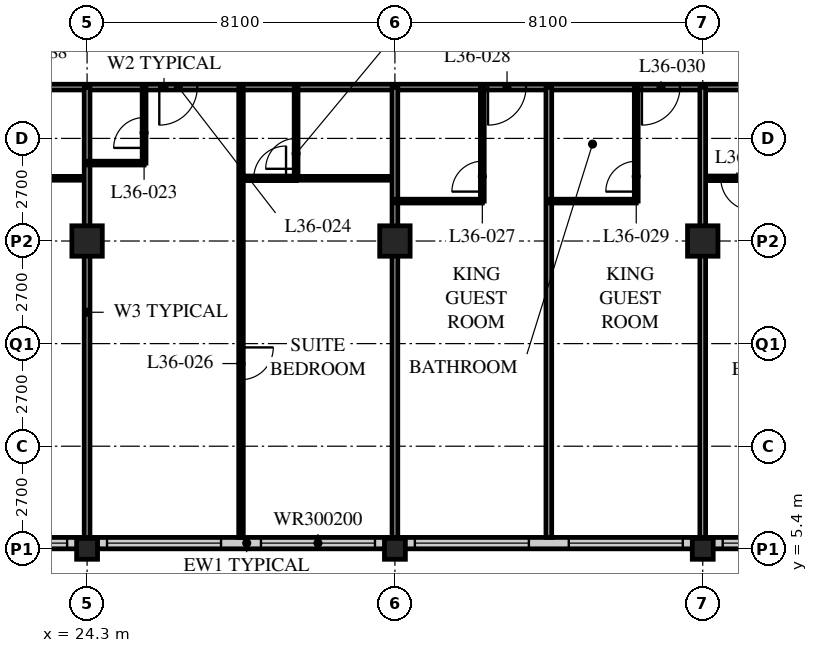
"""IFC4 building model, lengths in metres.
Left out: names, types, materials, properties, quantities, classifications, styles, units other than length and angle.
Written with IfcOpenShell. Run it as: python <this file> out.ifc"""

import sys

from ifc_helpers import new_model, si_unit, direction, frame, frame_2d, origin, origin_2d, place, context, subcontext, project, spatial, rectangle, hollow_rectangle, extrude, element, fill, save


model = new_model("IFC4")
c1 = context("Model", 3, precision=1e-05, world=origin(), true_north=direction((0.0, 1.0)))
c2 = subcontext(c1, "Body", "Model", "MODEL_VIEW")
j1 = project(units=[si_unit("LENGTHUNIT", "METRE"), si_unit("PLANEANGLEUNIT", "RADIAN")], contexts=[c1])
p1 = place(None, origin())
s1 = spatial("IfcSite", under=j1, at=p1, CompositionType="ELEMENT")
p2 = place(p1, origin())
s2 = spatial("IfcBuilding", under=s1, at=p2, CompositionType="ELEMENT")
p3 = place(p2, frame((0.0, 0.0, 140.8)))
s3 = spatial("IfcBuildingStorey", under=s2, at=p3, CompositionType="ELEMENT", Elevation=140.8)
p4 = place(p3, frame((24.3, 5.4, 0.0), z_axis=(0.0, 0.0, 1.0), x_axis=(1.0, 0.0, 0.0)))
e1 = element("IfcColumn", 1, at=p4, inside=s3, PredefinedType="COLUMN", context=c2, shape_type="SweptSolid", body=[
    extrude(hollow_rectangle(XDim=0.55, YDim=0.55, WallThickness=0.04, at=origin_2d()), origin(), (0.0, 0.0, 1.0), 3.4),
])
p5 = place(p3, frame((24.3, 13.5, 0.0), z_axis=(0.0, 0.0, 1.0), x_axis=(1.0, 0.0, 0.0)))
e2 = element("IfcColumn", 2, at=p5, inside=s3, PredefinedType="COLUMN", context=c2, shape_type="SweptSolid", body=[
    extrude(hollow_rectangle(XDim=0.8, YDim=0.8, WallThickness=0.08, at=origin_2d()), origin(), (0.0, 0.0, 1.0), 3.4),
])
p6 = place(p3, frame((32.4, 5.4, 0.0), z_axis=(0.0, 0.0, 1.0), x_axis=(1.0, 0.0, 0.0)))
e3 = element("IfcColumn", 3, at=p6, inside=s3, PredefinedType="COLUMN", context=c2, shape_type="SweptSolid", body=[
    extrude(hollow_rectangle(XDim=0.55, YDim=0.55, WallThickness=0.04, at=origin_2d()), origin(), (0.0, 0.0, 1.0), 3.4),
])
p7 = place(p3, frame((32.4, 13.5, 0.0), z_axis=(0.0, 0.0, 1.0), x_axis=(1.0, 0.0, 0.0)))
e4 = element("IfcColumn", 4, at=p7, inside=s3, PredefinedType="COLUMN", context=c2, shape_type="SweptSolid", body=[
    extrude(hollow_rectangle(XDim=0.8, YDim=0.8, WallThickness=0.08, at=origin_2d()), origin(), (0.0, 0.0, 1.0), 3.4),
])
p8 = place(p3, frame((40.5, 5.4, 0.0), z_axis=(0.0, 0.0, 1.0), x_axis=(1.0, 0.0, 0.0)))
e5 = element("IfcColumn", 5, at=p8, inside=s3, PredefinedType="COLUMN", context=c2, shape_type="SweptSolid", body=[
    extrude(hollow_rectangle(XDim=0.55, YDim=0.55, WallThickness=0.04, at=origin_2d()), origin(), (0.0, 0.0, 1.0), 3.4),
])
p9 = place(p3, frame((40.5, 13.5, 0.0), z_axis=(0.0, 0.0, 1.0), x_axis=(1.0, 0.0, 0.0)))
e6 = element("IfcColumn", 6, at=p9, inside=s3, PredefinedType="COLUMN", context=c2, shape_type="SweptSolid", body=[
    extrude(hollow_rectangle(XDim=0.8, YDim=0.8, WallThickness=0.08, at=origin_2d()), origin(), (0.0, 0.0, 1.0), 3.4),
])
p10 = place(p3, frame((8.4, 5.55, 0.0), z_axis=(0.0, 0.0, 1.0), x_axis=(1.0, 0.0, 0.0)))
e7 = element("IfcWall", 7, at=p10, inside=s3, PredefinedType="SOLIDWALL", context=c2, shape_type="SweptSolid", body=[
    extrude(rectangle(XDim=40.2, YDim=0.3, at=frame_2d((20.1, 0.0))), origin(), (0.0, 0.0, 1.0), 3.19),
])
p11 = place(p10, frame((0.225, 0.0, 0.9)))
e8 = element("IfcOpeningElement", 8, at=p11, cuts=e7, PredefinedType="OPENING", context=c2, shape_type="SweptSolid", body=[
    extrude(rectangle(XDim=3.0, YDim=2.0, at=frame_2d((1.5, 1.0))), frame((0.0, 0.16, 0.0), z_axis=(0.0, -1.0, 0.0), x_axis=(1.0, 0.0, 0.0)), (0.0, 0.0, 1.0), 0.32),
])
p12 = place(p10, frame((4.275, 0.0, 0.9)))
e9 = element("IfcOpeningElement", 9, at=p12, cuts=e7, PredefinedType="OPENING", context=c2, shape_type="SweptSolid", body=[
    extrude(rectangle(XDim=3.0, YDim=2.0, at=frame_2d((1.5, 1.0))), frame((0.0, 0.16, 0.0), z_axis=(0.0, -1.0, 0.0), x_axis=(1.0, 0.0, 0.0)), (0.0, 0.0, 1.0), 0.32),
])
p13 = place(p10, frame((8.325, 0.0, 0.9)))
e10 = element("IfcOpeningElement", 10, at=p13, cuts=e7, PredefinedType="OPENING", context=c2, shape_type="SweptSolid", body=[
    extrude(rectangle(XDim=3.0, YDim=2.0, at=frame_2d((1.5, 1.0))), frame((0.0, 0.16, 0.0), z_axis=(0.0, -1.0, 0.0), x_axis=(1.0, 0.0, 0.0)), (0.0, 0.0, 1.0), 0.32),
])
p14 = place(p10, frame((12.375, 0.0, 0.9)))
e11 = element("IfcOpeningElement", 11, at=p14, cuts=e7, PredefinedType="OPENING", context=c2, shape_type="SweptSolid", body=[
    extrude(rectangle(XDim=3.0, YDim=2.0, at=frame_2d((1.5, 1.0))), frame((0.0, 0.16, 0.0), z_axis=(0.0, -1.0, 0.0), x_axis=(1.0, 0.0, 0.0)), (0.0, 0.0, 1.0), 0.32),
])
p15 = place(p10, frame((16.425, 0.0, 0.9)))
e12 = element("IfcOpeningElement", 12, at=p15, cuts=e7, PredefinedType="OPENING", context=c2, shape_type="SweptSolid", body=[
    extrude(rectangle(XDim=3.0, YDim=2.0, at=frame_2d((1.5, 1.0))), frame((0.0, 0.16, 0.0), z_axis=(0.0, -1.0, 0.0), x_axis=(1.0, 0.0, 0.0)), (0.0, 0.0, 1.0), 0.32),
])
p16 = place(p10, frame((20.475, 0.0, 0.9)))
e13 = element("IfcOpeningElement", 13, at=p16, cuts=e7, PredefinedType="OPENING", context=c2, shape_type="SweptSolid", body=[
    extrude(rectangle(XDim=3.0, YDim=2.0, at=frame_2d((1.5, 1.0))), frame((0.0, 0.16, 0.0), z_axis=(0.0, -1.0, 0.0), x_axis=(1.0, 0.0, 0.0)), (0.0, 0.0, 1.0), 0.32),
])
p17 = place(p10, frame((24.525, 0.0, 0.9)))
e14 = element("IfcOpeningElement", 14, at=p17, cuts=e7, PredefinedType="OPENING", context=c2, shape_type="SweptSolid", body=[
    extrude(rectangle(XDim=3.0, YDim=2.0, at=frame_2d((1.5, 1.0))), frame((0.0, 0.16, 0.0), z_axis=(0.0, -1.0, 0.0), x_axis=(1.0, 0.0, 0.0)), (0.0, 0.0, 1.0), 0.32),
])
p18 = place(p10, frame((28.575, 0.0, 0.9)))
e15 = element("IfcOpeningElement", 15, at=p18, cuts=e7, PredefinedType="OPENING", context=c2, shape_type="SweptSolid", body=[
    extrude(rectangle(XDim=3.0, YDim=2.0, at=frame_2d((1.5, 1.0))), frame((0.0, 0.16, 0.0), z_axis=(0.0, -1.0, 0.0), x_axis=(1.0, 0.0, 0.0)), (0.0, 0.0, 1.0), 0.32),
])
p19 = place(p10, frame((32.625, 0.0, 0.9)))
e16 = element("IfcOpeningElement", 16, at=p19, cuts=e7, PredefinedType="OPENING", context=c2, shape_type="SweptSolid", body=[
    extrude(rectangle(XDim=3.0, YDim=2.0, at=frame_2d((1.5, 1.0))), frame((0.0, 0.16, 0.0), z_axis=(0.0, -1.0, 0.0), x_axis=(1.0, 0.0, 0.0)), (0.0, 0.0, 1.0), 0.32),
])
p20 = place(p10, frame((36.675, 0.0, 0.9)))
e17 = element("IfcOpeningElement", 17, at=p20, cuts=e7, PredefinedType="OPENING", context=c2, shape_type="SweptSolid", body=[
    extrude(rectangle(XDim=3.0, YDim=2.0, at=frame_2d((1.5, 1.0))), frame((0.0, 0.16, 0.0), z_axis=(0.0, -1.0, 0.0), x_axis=(1.0, 0.0, 0.0)), (0.0, 0.0, 1.0), 0.32),
])
p21 = place(p3, frame((8.1, 17.55, 0.0), z_axis=(0.0, 0.0, 1.0), x_axis=(1.0, 0.0, 0.0)))
e18 = element("IfcWall", 18, at=p21, inside=s3, PredefinedType="PARTITIONING", context=c2, shape_type="SweptSolid", body=[
    extrude(rectangle(XDim=36.45, YDim=0.15, at=frame_2d((18.225, 0.0))), origin(), (0.0, 0.0, 1.0), 3.19),
])
p22 = place(p21, frame((9.625, 0.0, 0.0)))
e19 = element("IfcOpeningElement", 19, at=p22, cuts=e18, PredefinedType="OPENING", context=c2, shape_type="SweptSolid", body=[
    extrude(rectangle(XDim=1.0, YDim=2.1, at=frame_2d((0.5, 1.05))), frame((0.0, 0.085, 0.0), z_axis=(0.0, -1.0, 0.0), x_axis=(1.0, 0.0, 0.0)), (0.0, 0.0, 1.0), 0.17),
])
p23 = place(p21, frame((18.1, 0.0, 0.0)))
e20 = element("IfcOpeningElement", 20, at=p23, cuts=e18, PredefinedType="OPENING", context=c2, shape_type="SweptSolid", body=[
    extrude(rectangle(XDim=1.0, YDim=2.1, at=frame_2d((0.5, 1.05))), frame((0.0, 0.085, 0.0), z_axis=(0.0, -1.0, 0.0), x_axis=(1.0, 0.0, 0.0)), (0.0, 0.0, 1.0), 0.17),
])
p24 = place(p21, frame((26.75, 0.0, 0.0)))
e21 = element("IfcOpeningElement", 21, at=p24, cuts=e18, PredefinedType="OPENING", context=c2, shape_type="SweptSolid", body=[
    extrude(rectangle(XDim=1.0, YDim=2.1, at=frame_2d((0.5, 1.05))), frame((0.0, 0.085, 0.0), z_axis=(0.0, -1.0, 0.0), x_axis=(1.0, 0.0, 0.0)), (0.0, 0.0, 1.0), 0.17),
])
p25 = place(p21, frame((30.8, 0.0, 0.0)))
e22 = element("IfcOpeningElement", 22, at=p25, cuts=e18, PredefinedType="OPENING", context=c2, shape_type="SweptSolid", body=[
    extrude(rectangle(XDim=1.0, YDim=2.1, at=frame_2d((0.5, 1.05))), frame((0.0, 0.085, 0.0), z_axis=(0.0, -1.0, 0.0), x_axis=(1.0, 0.0, 0.0)), (0.0, 0.0, 1.0), 0.17),
])
p26 = place(p21, frame((1.525, 0.0, 0.0)))
e23 = element("IfcOpeningElement", 23, at=p26, cuts=e18, PredefinedType="OPENING", context=c2, shape_type="SweptSolid", body=[
    extrude(rectangle(XDim=1.0, YDim=2.1, at=frame_2d((0.5, 1.05))), frame((0.0, 0.085, 0.0), z_axis=(0.0, -1.0, 0.0), x_axis=(1.0, 0.0, 0.0)), (0.0, 0.0, 1.0), 0.17),
])
p27 = place(p21, frame((33.925, 0.0, 0.0)))
e24 = element("IfcOpeningElement", 24, at=p27, cuts=e18, PredefinedType="OPENING", context=c2, shape_type="SweptSolid", body=[
    extrude(rectangle(XDim=1.0, YDim=2.1, at=frame_2d((0.5, 1.05))), frame((0.0, 0.085, 0.0), z_axis=(0.0, -1.0, 0.0), x_axis=(1.0, 0.0, 0.0)), (0.0, 0.0, 1.0), 0.17),
])
p28 = place(p3, frame((21.7, 15.15, 0.0), z_axis=(0.0, 0.0, 1.0), x_axis=(1.0, 0.0, 0.0)))
e25 = element("IfcWall", 25, at=p28, inside=s3, PredefinedType="PARTITIONING", context=c2, shape_type="SweptSolid", body=[
    extrude(rectangle(XDim=2.6, YDim=0.1, at=frame_2d((1.3, 0.0))), origin(), (0.0, 0.0, 1.0), 3.19),
])
p29 = place(p3, frame((24.3, 17.55, 0.0), z_axis=(0.0, 0.0, 1.0), x_axis=(0.0, -1.0, 0.0)))
e26 = element("IfcWall", 26, at=p29, inside=s3, PredefinedType="PARTITIONING", context=c2, shape_type="SweptSolid", body=[
    extrude(rectangle(XDim=11.85, YDim=0.15, at=frame_2d((5.925, 0.0))), origin(), (0.0, 0.0, 1.0), 2.578),
])
p30 = place(p3, frame((24.3, 15.55, 0.0), z_axis=(0.0, 0.0, 1.0), x_axis=(1.0, 0.0, 0.0)))
e27 = element("IfcWall", 27, at=p30, inside=s3, PredefinedType="PARTITIONING", context=c2, shape_type="SweptSolid", body=[
    extrude(rectangle(XDim=1.5, YDim=0.1, at=frame_2d((0.75, 0.0))), origin(), (0.0, 0.0, 1.0), 3.19),
])
p31 = place(p3, frame((25.8, 17.55, 0.0), z_axis=(0.0, 0.0, 1.0), x_axis=(0.0, -1.0, 0.0)))
e28 = element("IfcWall", 28, at=p31, inside=s3, PredefinedType="PARTITIONING", context=c2, shape_type="SweptSolid", body=[
    extrude(rectangle(XDim=2.0, YDim=0.1, at=frame_2d((1.0, 0.0))), origin(), (0.0, 0.0, 1.0), 3.19),
])
p32 = place(p31, frame((0.8, 0.0, 0.0)))
e29 = element("IfcOpeningElement", 29, at=p32, cuts=e28, PredefinedType="OPENING", context=c2, shape_type="SweptSolid", body=[
    extrude(rectangle(XDim=0.8, YDim=2.1, at=frame_2d((0.4, 1.05))), frame((0.0, 0.06, 0.0), z_axis=(0.0, -1.0, 0.0), x_axis=(1.0, 0.0, 0.0)), (0.0, 0.0, 1.0), 0.12),
])
p33 = place(p3, frame((29.8, 15.15, 0.0), z_axis=(0.0, 0.0, 1.0), x_axis=(1.0, 0.0, 0.0)))
e30 = element("IfcWall", 30, at=p33, inside=s3, PredefinedType="PARTITIONING", context=c2, shape_type="SweptSolid", body=[
    extrude(rectangle(XDim=2.6, YDim=0.1, at=frame_2d((1.3, 0.0))), origin(), (0.0, 0.0, 1.0), 3.19),
])
p34 = place(p3, frame((29.8, 17.55, 0.0), z_axis=(0.0, 0.0, 1.0), x_axis=(0.0, -1.0, 0.0)))
e31 = element("IfcWall", 31, at=p34, inside=s3, PredefinedType="PARTITIONING", context=c2, shape_type="SweptSolid", body=[
    extrude(rectangle(XDim=2.4, YDim=0.1, at=frame_2d((1.2, 0.0))), origin(), (0.0, 0.0, 1.0), 3.19),
])
p35 = place(p34, frame((1.35, 0.0, 0.0)))
e32 = element("IfcOpeningElement", 32, at=p35, cuts=e31, PredefinedType="OPENING", context=c2, shape_type="SweptSolid", body=[
    extrude(rectangle(XDim=0.8, YDim=2.1, at=frame_2d((0.4, 1.05))), frame((0.0, 0.06, 0.0), z_axis=(0.0, -1.0, 0.0), x_axis=(1.0, 0.0, 0.0)), (0.0, 0.0, 1.0), 0.12),
])
p36 = place(p3, frame((28.35, 17.55, 0.0), z_axis=(0.0, 0.0, 1.0), x_axis=(0.0, -1.0, 0.0)))
e33 = element("IfcWall", 33, at=p36, inside=s3, PredefinedType="PARTITIONING", context=c2, shape_type="SweptSolid", body=[
    extrude(rectangle(XDim=11.85, YDim=0.12, at=frame_2d((5.925, 0.0))), origin(), (0.0, 0.0, 1.0), 3.19),
])
p37 = place(p36, frame((6.85, 0.0, 0.0)))
e34 = element("IfcOpeningElement", 34, at=p37, cuts=e33, PredefinedType="OPENING", context=c2, shape_type="SweptSolid", body=[
    extrude(rectangle(XDim=0.85, YDim=2.1, at=frame_2d((0.425, 1.05))), frame((0.0, 0.07, 0.0), z_axis=(0.0, -1.0, 0.0), x_axis=(1.0, 0.0, 0.0)), (0.0, 0.0, 1.0), 0.14),
])
p38 = place(p3, frame((32.4, 17.55, 0.0), z_axis=(0.0, 0.0, 1.0), x_axis=(0.0, -1.0, 0.0)))
e35 = element("IfcWall", 35, at=p38, inside=s3, PredefinedType="PARTITIONING", context=c2, shape_type="SweptSolid", body=[
    extrude(rectangle(XDim=11.85, YDim=0.15, at=frame_2d((5.925, 0.0))), origin(), (0.0, 0.0, 1.0), 2.578),
])
p39 = place(p3, frame((32.4, 14.55, 0.0), z_axis=(0.0, 0.0, 1.0), x_axis=(1.0, 0.0, 0.0)))
e36 = element("IfcWall", 36, at=p39, inside=s3, PredefinedType="PARTITIONING", context=c2, shape_type="SweptSolid", body=[
    extrude(rectangle(XDim=2.3, YDim=0.1, at=frame_2d((1.15, 0.0))), origin(), (0.0, 0.0, 1.0), 3.19),
])
p40 = place(p3, frame((34.7, 17.55, 0.0), z_axis=(0.0, 0.0, 1.0), x_axis=(0.0, -1.0, 0.0)))
e37 = element("IfcWall", 37, at=p40, inside=s3, PredefinedType="PARTITIONING", context=c2, shape_type="SweptSolid", body=[
    extrude(rectangle(XDim=3.0, YDim=0.1, at=frame_2d((1.5, 0.0))), origin(), (0.0, 0.0, 1.0), 3.19),
])
p41 = place(p40, frame((1.95, 0.0, 0.0)))
e38 = element("IfcOpeningElement", 38, at=p41, cuts=e37, PredefinedType="OPENING", context=c2, shape_type="SweptSolid", body=[
    extrude(rectangle(XDim=0.8, YDim=2.1, at=frame_2d((0.4, 1.05))), frame((0.0, 0.06, 0.0), z_axis=(0.0, -1.0, 0.0), x_axis=(1.0, 0.0, 0.0)), (0.0, 0.0, 1.0), 0.12),
])
p42 = place(p3, frame((36.45, 17.55, 0.0), z_axis=(0.0, 0.0, 1.0), x_axis=(0.0, -1.0, 0.0)))
e39 = element("IfcWall", 39, at=p42, inside=s3, PredefinedType="PARTITIONING", context=c2, shape_type="SweptSolid", body=[
    extrude(rectangle(XDim=11.85, YDim=0.15, at=frame_2d((5.925, 0.0))), origin(), (0.0, 0.0, 1.0), 3.19),
])
p43 = place(p3, frame((36.45, 14.55, 0.0), z_axis=(0.0, 0.0, 1.0), x_axis=(1.0, 0.0, 0.0)))
e40 = element("IfcWall", 40, at=p43, inside=s3, PredefinedType="PARTITIONING", context=c2, shape_type="SweptSolid", body=[
    extrude(rectangle(XDim=2.3, YDim=0.1, at=frame_2d((1.15, 0.0))), origin(), (0.0, 0.0, 1.0), 3.19),
])
p44 = place(p3, frame((38.75, 17.55, 0.0), z_axis=(0.0, 0.0, 1.0), x_axis=(0.0, -1.0, 0.0)))
e41 = element("IfcWall", 41, at=p44, inside=s3, PredefinedType="PARTITIONING", context=c2, shape_type="SweptSolid", body=[
    extrude(rectangle(XDim=3.0, YDim=0.1, at=frame_2d((1.5, 0.0))), origin(), (0.0, 0.0, 1.0), 3.19),
])
p45 = place(p44, frame((1.95, 0.0, 0.0)))
e42 = element("IfcOpeningElement", 42, at=p45, cuts=e41, PredefinedType="OPENING", context=c2, shape_type="SweptSolid", body=[
    extrude(rectangle(XDim=0.8, YDim=2.1, at=frame_2d((0.4, 1.05))), frame((0.0, 0.06, 0.0), z_axis=(0.0, -1.0, 0.0), x_axis=(1.0, 0.0, 0.0)), (0.0, 0.0, 1.0), 0.12),
])
p46 = place(p3, frame((40.5, 15.15, 0.0), z_axis=(0.0, 0.0, 1.0), x_axis=(1.0, 0.0, 0.0)))
e43 = element("IfcWall", 43, at=p46, inside=s3, PredefinedType="PARTITIONING", context=c2, shape_type="SweptSolid", body=[
    extrude(rectangle(XDim=8.05, YDim=0.12, at=frame_2d((4.025, 0.0))), origin(), (0.0, 0.0, 1.0), 3.19),
])
p47 = place(p46, frame((0.475, 0.0, 0.0)))
e44 = element("IfcOpeningElement", 44, at=p47, cuts=e43, PredefinedType="OPENING", context=c2, shape_type="SweptSolid", body=[
    extrude(rectangle(XDim=0.85, YDim=2.1, at=frame_2d((0.425, 1.05))), frame((0.0, 0.07, 0.0), z_axis=(0.0, -1.0, 0.0), x_axis=(1.0, 0.0, 0.0)), (0.0, 0.0, 1.0), 0.14),
])
p48 = place(p46, frame((4.325, 0.0, 0.0)))
e45 = element("IfcOpeningElement", 45, at=p48, cuts=e43, PredefinedType="OPENING", context=c2, shape_type="SweptSolid", body=[
    extrude(rectangle(XDim=0.85, YDim=2.1, at=frame_2d((0.425, 1.05))), frame((0.0, 0.07, 0.0), z_axis=(0.0, -1.0, 0.0), x_axis=(1.0, 0.0, 0.0)), (0.0, 0.0, 1.0), 0.14),
])
p49 = place(p3, frame((40.5, 17.55, 0.0), z_axis=(0.0, 0.0, 1.0), x_axis=(0.0, -1.0, 0.0)))
e46 = element("IfcWall", 46, at=p49, inside=s3, PredefinedType="PARTITIONING", context=c2, shape_type="SweptSolid", body=[
    extrude(rectangle(XDim=11.85, YDim=0.15, at=frame_2d((5.925, 0.0))), origin(), (0.0, 0.0, 1.0), 2.578),
])
p50 = place(p3, frame((29.81, 15.15, 0.0), z_axis=(0.0, 0.0, 1.0), x_axis=(-1.0, 0.0, 0.0)))
e47 = element("IfcWall", 47, at=p50, inside=s3, PredefinedType="PARTITIONING", context=c2, shape_type="SweptSolid", body=[
    extrude(rectangle(XDim=1.46, YDim=0.12, at=frame_2d((0.73, 0.0))), origin(), (0.0, 0.0, 1.0), 3.19),
])
p51 = place(p50, frame((0.275, 0.0, 0.0)))
e48 = element("IfcOpeningElement", 48, at=p51, cuts=e47, PredefinedType="OPENING", context=c2, shape_type="SweptSolid", body=[
    extrude(rectangle(XDim=0.85, YDim=2.1, at=frame_2d((0.425, 1.05))), frame((0.0, 0.07, 0.0), z_axis=(0.0, -1.0, 0.0), x_axis=(1.0, 0.0, 0.0)), (0.0, 0.0, 1.0), 0.14),
])
p52 = place(p14, origin())
e49 = element("IfcWindow", 49, at=p52, inside=s3, PartitioningType="SINGLE_PANEL", PredefinedType="WINDOW", context=c2, shape_type="SweptSolid", body=[
    extrude(rectangle(XDim=3.0, YDim=2.0, at=frame_2d((1.5, 1.0))), frame((0.0, 0.03, 0.0), z_axis=(0.0, -1.0, 0.0), x_axis=(1.0, 0.0, 0.0)), (0.0, 0.0, 1.0), 0.06),
])
fill(e11, e49)
p53 = place(p15, origin())
e50 = element("IfcWindow", 50, at=p53, inside=s3, PartitioningType="SINGLE_PANEL", PredefinedType="WINDOW", context=c2, shape_type="SweptSolid", body=[
    extrude(rectangle(XDim=3.0, YDim=2.0, at=frame_2d((1.5, 1.0))), frame((0.0, 0.03, 0.0), z_axis=(0.0, -1.0, 0.0), x_axis=(1.0, 0.0, 0.0)), (0.0, 0.0, 1.0), 0.06),
])
fill(e12, e50)
p54 = place(p16, origin())
e51 = element("IfcWindow", 51, at=p54, inside=s3, PartitioningType="SINGLE_PANEL", PredefinedType="WINDOW", context=c2, shape_type="SweptSolid", body=[
    extrude(rectangle(XDim=3.0, YDim=2.0, at=frame_2d((1.5, 1.0))), frame((0.0, 0.03, 0.0), z_axis=(0.0, -1.0, 0.0), x_axis=(1.0, 0.0, 0.0)), (0.0, 0.0, 1.0), 0.06),
])
fill(e13, e51)
p55 = place(p17, origin())
e52 = element("IfcWindow", 52, at=p55, inside=s3, PartitioningType="SINGLE_PANEL", PredefinedType="WINDOW", context=c2, shape_type="SweptSolid", body=[
    extrude(rectangle(XDim=3.0, YDim=2.0, at=frame_2d((1.5, 1.0))), frame((0.0, 0.03, 0.0), z_axis=(0.0, -1.0, 0.0), x_axis=(1.0, 0.0, 0.0)), (0.0, 0.0, 1.0), 0.06),
])
fill(e14, e52)
p56 = place(p18, origin())
e53 = element("IfcWindow", 53, at=p56, inside=s3, PartitioningType="SINGLE_PANEL", PredefinedType="WINDOW", context=c2, shape_type="SweptSolid", body=[
    extrude(rectangle(XDim=3.0, YDim=2.0, at=frame_2d((1.5, 1.0))), frame((0.0, 0.03, 0.0), z_axis=(0.0, -1.0, 0.0), x_axis=(1.0, 0.0, 0.0)), (0.0, 0.0, 1.0), 0.06),
])
fill(e15, e53)
p57 = place(p19, origin())
e54 = element("IfcWindow", 54, at=p57, inside=s3, PartitioningType="SINGLE_PANEL", PredefinedType="WINDOW", context=c2, shape_type="SweptSolid", body=[
    extrude(rectangle(XDim=3.0, YDim=2.0, at=frame_2d((1.5, 1.0))), frame((0.0, 0.03, 0.0), z_axis=(0.0, -1.0, 0.0), x_axis=(1.0, 0.0, 0.0)), (0.0, 0.0, 1.0), 0.06),
])
fill(e16, e54)
p58 = place(p32, origin())
e55 = element("IfcDoor", 55, at=p58, inside=s3, OperationType="SINGLE_SWING_LEFT", PredefinedType="DOOR", context=c2, shape_type="SweptSolid", body=[
    extrude(rectangle(XDim=0.8, YDim=2.1, at=frame_2d((0.4, 1.05))), frame((0.0, 0.025, 0.0), z_axis=(0.0, -1.0, 0.0), x_axis=(1.0, 0.0, 0.0)), (0.0, 0.0, 1.0), 0.05),
])
fill(e29, e55)
p59 = place(p23, origin())
e56 = element("IfcDoor", 56, at=p59, inside=s3, OperationType="SINGLE_SWING_RIGHT", PredefinedType="DOOR", context=c2, shape_type="SweptSolid", body=[
    extrude(rectangle(XDim=1.0, YDim=2.1, at=frame_2d((0.5, 1.05))), frame((0.0, 0.025, 0.0), z_axis=(0.0, -1.0, 0.0), x_axis=(1.0, 0.0, 0.0)), (0.0, 0.0, 1.0), 0.05),
])
fill(e20, e56)
p60 = place(p35, origin())
e57 = element("IfcDoor", 57, at=p60, inside=s3, OperationType="SINGLE_SWING_LEFT", PredefinedType="DOOR", context=c2, shape_type="SweptSolid", body=[
    extrude(rectangle(XDim=0.8, YDim=2.1, at=frame_2d((0.4, 1.05))), frame((0.0, 0.025, 0.0), z_axis=(0.0, -1.0, 0.0), x_axis=(1.0, 0.0, 0.0)), (0.0, 0.0, 1.0), 0.05),
])
fill(e32, e57)
p61 = place(p37, origin())
e58 = element("IfcDoor", 58, at=p61, inside=s3, OperationType="SINGLE_SWING_LEFT", PredefinedType="DOOR", context=c2, shape_type="SweptSolid", body=[
    extrude(rectangle(XDim=0.85, YDim=2.1, at=frame_2d((0.425, 1.05))), frame((0.0, 0.025, 0.0), z_axis=(0.0, -1.0, 0.0), x_axis=(1.0, 0.0, 0.0)), (0.0, 0.0, 1.0), 0.05),
])
fill(e34, e58)
p62 = place(p41, origin())
e59 = element("IfcDoor", 59, at=p62, inside=s3, OperationType="SINGLE_SWING_LEFT", PredefinedType="DOOR", context=c2, shape_type="SweptSolid", body=[
    extrude(rectangle(XDim=0.8, YDim=2.1, at=frame_2d((0.4, 1.05))), frame((0.0, 0.025, 0.0), z_axis=(0.0, -1.0, 0.0), x_axis=(1.0, 0.0, 0.0)), (0.0, 0.0, 1.0), 0.05),
])
fill(e38, e59)
p63 = place(p24, origin())
e60 = element("IfcDoor", 60, at=p63, inside=s3, OperationType="SINGLE_SWING_RIGHT", PredefinedType="DOOR", context=c2, shape_type="SweptSolid", body=[
    extrude(rectangle(XDim=1.0, YDim=2.1, at=frame_2d((0.5, 1.05))), frame((0.0, 0.025, 0.0), z_axis=(0.0, -1.0, 0.0), x_axis=(1.0, 0.0, 0.0)), (0.0, 0.0, 1.0), 0.05),
])
fill(e21, e60)
p64 = place(p45, origin())
e61 = element("IfcDoor", 61, at=p64, inside=s3, OperationType="SINGLE_SWING_LEFT", PredefinedType="DOOR", context=c2, shape_type="SweptSolid", body=[
    extrude(rectangle(XDim=0.8, YDim=2.1, at=frame_2d((0.4, 1.05))), frame((0.0, 0.025, 0.0), z_axis=(0.0, -1.0, 0.0), x_axis=(1.0, 0.0, 0.0)), (0.0, 0.0, 1.0), 0.05),
])
fill(e42, e61)
p65 = place(p25, origin())
e62 = element("IfcDoor", 62, at=p65, inside=s3, OperationType="SINGLE_SWING_RIGHT", PredefinedType="DOOR", context=c2, shape_type="SweptSolid", body=[
    extrude(rectangle(XDim=1.0, YDim=2.1, at=frame_2d((0.5, 1.05))), frame((0.0, 0.025, 0.0), z_axis=(0.0, -1.0, 0.0), x_axis=(1.0, 0.0, 0.0)), (0.0, 0.0, 1.0), 0.05),
])
fill(e22, e62)
p66 = place(p47, origin())
e63 = element("IfcDoor", 63, at=p66, inside=s3, OperationType="SINGLE_SWING_LEFT", PredefinedType="DOOR", context=c2, shape_type="SweptSolid", body=[
    extrude(rectangle(XDim=0.85, YDim=2.1, at=frame_2d((0.425, 1.05))), frame((0.0, 0.025, 0.0), z_axis=(0.0, -1.0, 0.0), x_axis=(1.0, 0.0, 0.0)), (0.0, 0.0, 1.0), 0.05),
])
fill(e44, e63)
p67 = place(p51, origin())
e64 = element("IfcDoor", 64, at=p67, inside=s3, OperationType="SINGLE_SWING_RIGHT", PredefinedType="DOOR", context=c2, shape_type="SweptSolid", body=[
    extrude(rectangle(XDim=0.85, YDim=2.1, at=frame_2d((0.425, 1.05))), frame((0.0, 0.025, 0.0), z_axis=(0.0, -1.0, 0.0), x_axis=(1.0, 0.0, 0.0)), (0.0, 0.0, 1.0), 0.05),
])
fill(e48, e64)
save(model, sys.argv[1])
